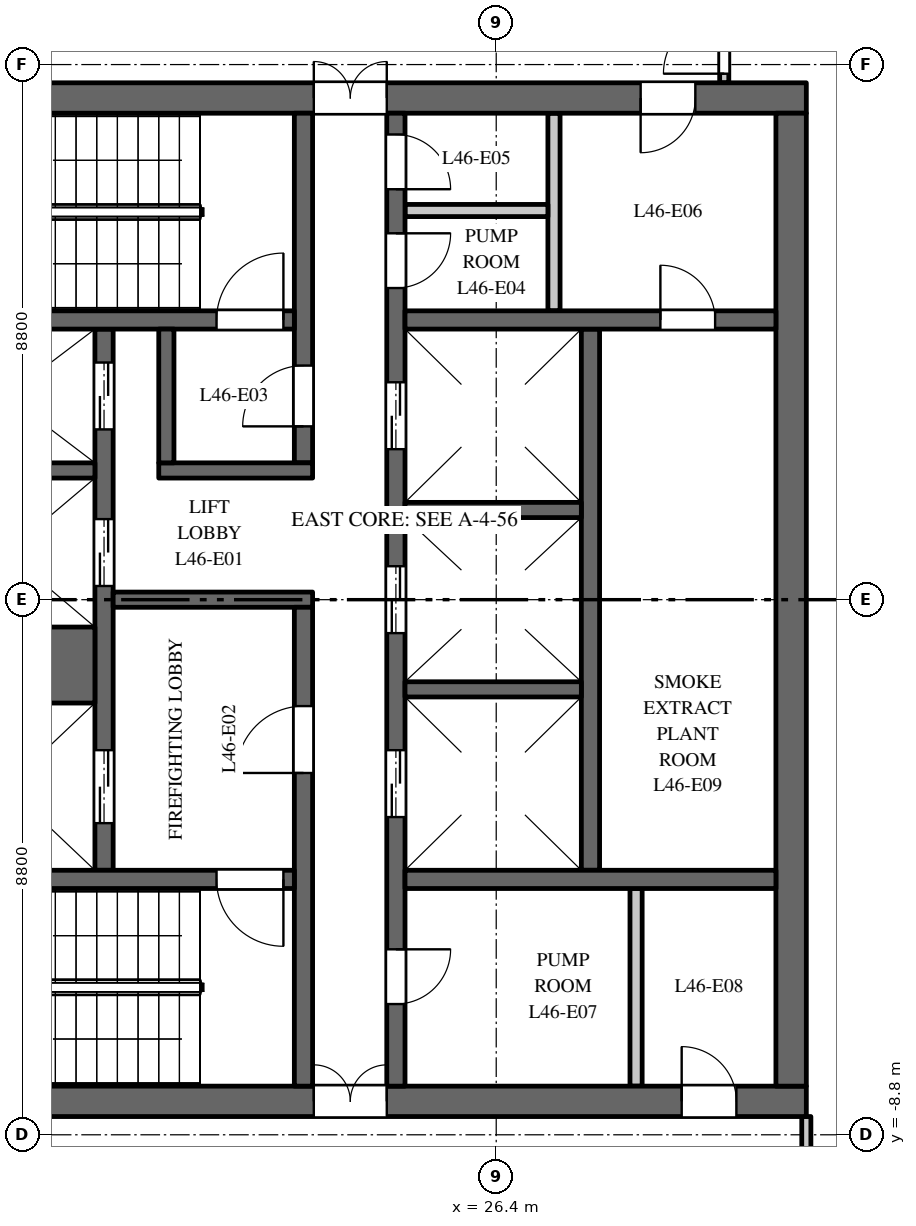
"""IFC4 building model, lengths in metres.
Left out: names, types, materials, properties, quantities, classifications, styles, units other than length and angle.
Written with IfcOpenShell. Run it as: python <this file> out.ifc"""

import sys

from ifc_helpers import new_model, si_unit, direction, frame, frame_2d, origin, place, context, subcontext, project, spatial, rectangle, extrude, element, fill, save


model = new_model("IFC4")
c1 = context("Model", 3, precision=1e-05, world=origin(), true_north=direction((0.0, 1.0)))
c2 = subcontext(c1, "Body", "Model", "MODEL_VIEW")
j1 = project(units=[si_unit("LENGTHUNIT", "METRE"), si_unit("PLANEANGLEUNIT", "RADIAN")], contexts=[c1])
p1 = place(None, origin())
s1 = spatial("IfcSite", under=j1, at=p1, CompositionType="ELEMENT")
p2 = place(p1, origin())
s2 = spatial("IfcBuilding", under=s1, at=p2, CompositionType="ELEMENT")
p3 = place(p2, frame((0.0, 0.0, 198.0)))
s3 = spatial("IfcBuildingStorey", under=s2, at=p3, CompositionType="ELEMENT", Elevation=198.0)
p4 = place(p3, frame((16.5, 8.25, 0.0), z_axis=(0.0, 0.0, 1.0), x_axis=(1.0, 0.0, 0.0)))
e1 = element("IfcWall", 1, at=p4, inside=s3, PredefinedType="SHEAR", context=c2, shape_type="SweptSolid", body=[
    extrude(rectangle(XDim=15.0, YDim=0.5, at=frame_2d((7.5, 0.0))), origin(), (0.0, 0.0, 1.0), 5.15),
])
p5 = place(p4, frame((6.9, 0.0, 0.0)))
e2 = element("IfcOpeningElement", 2, at=p5, cuts=e1, PredefinedType="OPENING", context=c2, shape_type="SweptSolid", body=[
    extrude(rectangle(XDim=1.2, YDim=2.1, at=frame_2d((0.6, 1.05))), frame((0.0, 0.26, 0.0), z_axis=(0.0, -1.0, 0.0), x_axis=(1.0, 0.0, 0.0)), (0.0, 0.0, 1.0), 0.52),
])
p6 = place(p4, frame((12.275, 0.0, 0.0)))
e3 = element("IfcOpeningElement", 3, at=p6, cuts=e1, PredefinedType="OPENING", context=c2, shape_type="SweptSolid", body=[
    extrude(rectangle(XDim=0.9, YDim=2.1, at=frame_2d((0.45, 1.05))), frame((0.0, 0.26, 0.0), z_axis=(0.0, -1.0, 0.0), x_axis=(1.0, 0.0, 0.0)), (0.0, 0.0, 1.0), 0.52),
])
p7 = place(p3, frame((16.5, -8.25, 0.0), z_axis=(0.0, 0.0, 1.0), x_axis=(1.0, 0.0, 0.0)))
e4 = element("IfcWall", 4, at=p7, inside=s3, PredefinedType="SHEAR", context=c2, shape_type="SweptSolid", body=[
    extrude(rectangle(XDim=15.0, YDim=0.5, at=frame_2d((7.5, 0.0))), origin(), (0.0, 0.0, 1.0), 5.15),
])
p8 = place(p7, frame((6.9, 0.0, 0.0)))
e5 = element("IfcOpeningElement", 5, at=p8, cuts=e4, PredefinedType="OPENING", context=c2, shape_type="SweptSolid", body=[
    extrude(rectangle(XDim=1.2, YDim=2.1, at=frame_2d((0.6, 1.05))), frame((0.0, 0.26, 0.0), z_axis=(0.0, -1.0, 0.0), x_axis=(1.0, 0.0, 0.0)), (0.0, 0.0, 1.0), 0.52),
])
p9 = place(p7, frame((12.95, 0.0, 0.0)))
e6 = element("IfcOpeningElement", 6, at=p9, cuts=e4, PredefinedType="OPENING", context=c2, shape_type="SweptSolid", body=[
    extrude(rectangle(XDim=0.9, YDim=2.1, at=frame_2d((0.45, 1.05))), frame((0.0, 0.26, 0.0), z_axis=(0.0, -1.0, 0.0), x_axis=(1.0, 0.0, 0.0)), (0.0, 0.0, 1.0), 0.52),
])
p10 = place(p3, frame((27.95, -4.45, 0.0), z_axis=(0.0, 0.0, 1.0), x_axis=(0.0, 1.0, 0.0)))
e7 = element("IfcWall", 7, at=p10, inside=s3, PredefinedType="SHEAR", context=c2, shape_type="SweptSolid", body=[
    extrude(rectangle(XDim=8.9, YDim=0.3, at=frame_2d((4.45, 0.0))), origin(), (0.0, 0.0, 1.0), 5.15),
])
p11 = place(p3, frame((19.95, -4.45, 0.0), z_axis=(0.0, 0.0, 1.0), x_axis=(0.0, 1.0, 0.0)))
e8 = element("IfcWall", 8, at=p11, inside=s3, PredefinedType="SHEAR", context=c2, shape_type="SweptSolid", body=[
    extrude(rectangle(XDim=8.9, YDim=0.3, at=frame_2d((4.45, 0.0))), origin(), (0.0, 0.0, 1.0), 5.15),
])
p12 = place(p11, frame((0.775, 0.0, 0.0)))
e9 = element("IfcOpeningElement", 9, at=p12, cuts=e8, PredefinedType="OPENING", context=c2, shape_type="SweptSolid", body=[
    extrude(rectangle(XDim=1.2, YDim=2.1, at=frame_2d((0.6, 1.05))), frame((0.0, 0.16, 0.0), z_axis=(0.0, -1.0, 0.0), x_axis=(1.0, 0.0, 0.0)), (0.0, 0.0, 1.0), 0.32),
])
p13 = place(p11, frame((4.675, 0.0, 0.0)))
e10 = element("IfcOpeningElement", 10, at=p13, cuts=e8, PredefinedType="OPENING", context=c2, shape_type="SweptSolid", body=[
    extrude(rectangle(XDim=1.1, YDim=2.1, at=frame_2d((0.55, 1.05))), frame((0.0, 0.16, 0.0), z_axis=(0.0, -1.0, 0.0), x_axis=(1.0, 0.0, 0.0)), (0.0, 0.0, 1.0), 0.32),
])
p14 = place(p11, frame((7.25, 0.0, 0.0)))
e11 = element("IfcOpeningElement", 11, at=p14, cuts=e8, PredefinedType="OPENING", context=c2, shape_type="SweptSolid", body=[
    extrude(rectangle(XDim=1.1, YDim=2.1, at=frame_2d((0.55, 1.05))), frame((0.0, 0.16, 0.0), z_axis=(0.0, -1.0, 0.0), x_axis=(1.0, 0.0, 0.0)), (0.0, 0.0, 1.0), 0.32),
])
p15 = place(p3, frame((24.75, -8.0, 0.0), z_axis=(0.0, 0.0, 1.0), x_axis=(0.0, 1.0, 0.0)))
e12 = element("IfcWall", 12, at=p15, inside=s3, PredefinedType="SHEAR", context=c2, shape_type="SweptSolid", body=[
    extrude(rectangle(XDim=16.0, YDim=0.3, at=frame_2d((8.0, 0.0))), origin(), (0.0, 0.0, 1.0), 5.15),
])
p16 = place(p15, frame((4.425, 0.0, 0.0)))
e13 = element("IfcOpeningElement", 13, at=p16, cuts=e12, PredefinedType="OPENING", context=c2, shape_type="SweptSolid", body=[
    extrude(rectangle(XDim=1.1, YDim=2.1, at=frame_2d((0.55, 1.05))), frame((0.0, 0.16, 0.0), z_axis=(0.0, -1.0, 0.0), x_axis=(1.0, 0.0, 0.0)), (0.0, 0.0, 1.0), 0.32),
])
p17 = place(p15, frame((7.45, 0.0, 0.0)))
e14 = element("IfcOpeningElement", 14, at=p17, cuts=e12, PredefinedType="OPENING", context=c2, shape_type="SweptSolid", body=[
    extrude(rectangle(XDim=1.1, YDim=2.1, at=frame_2d((0.55, 1.05))), frame((0.0, 0.16, 0.0), z_axis=(0.0, -1.0, 0.0), x_axis=(1.0, 0.0, 0.0)), (0.0, 0.0, 1.0), 0.32),
])
p18 = place(p15, frame((10.475, 0.0, 0.0)))
e15 = element("IfcOpeningElement", 15, at=p18, cuts=e12, PredefinedType="OPENING", context=c2, shape_type="SweptSolid", body=[
    extrude(rectangle(XDim=1.1, YDim=2.1, at=frame_2d((0.55, 1.05))), frame((0.0, 0.16, 0.0), z_axis=(0.0, -1.0, 0.0), x_axis=(1.0, 0.0, 0.0)), (0.0, 0.0, 1.0), 0.32),
])
p19 = place(p15, frame((13.125, 0.0, 0.0)))
e16 = element("IfcOpeningElement", 16, at=p19, cuts=e12, PredefinedType="OPENING", context=c2, shape_type="SweptSolid", body=[
    extrude(rectangle(XDim=0.9, YDim=2.1, at=frame_2d((0.45, 1.05))), frame((0.0, 0.16, 0.0), z_axis=(0.0, -1.0, 0.0), x_axis=(1.0, 0.0, 0.0)), (0.0, 0.0, 1.0), 0.32),
])
p20 = place(p15, frame((14.75, 0.0, 0.0)))
e17 = element("IfcOpeningElement", 17, at=p20, cuts=e12, PredefinedType="OPENING", context=c2, shape_type="SweptSolid", body=[
    extrude(rectangle(XDim=0.9, YDim=2.1, at=frame_2d((0.45, 1.05))), frame((0.0, 0.16, 0.0), z_axis=(0.0, -1.0, 0.0), x_axis=(1.0, 0.0, 0.0)), (0.0, 0.0, 1.0), 0.32),
])
p21 = place(p15, frame((1.35, 0.0, 0.0)))
e18 = element("IfcOpeningElement", 18, at=p21, cuts=e12, PredefinedType="OPENING", context=c2, shape_type="SweptSolid", body=[
    extrude(rectangle(XDim=0.9, YDim=2.1, at=frame_2d((0.45, 1.05))), frame((0.0, 0.16, 0.0), z_axis=(0.0, -1.0, 0.0), x_axis=(1.0, 0.0, 0.0)), (0.0, 0.0, 1.0), 0.32),
])
p22 = place(p3, frame((20.1, 0.0, 0.0), z_axis=(0.0, 0.0, 1.0), x_axis=(1.0, 0.0, 0.0)))
e19 = element("IfcWall", 19, at=p22, inside=s3, PredefinedType="SHEAR", context=c2, shape_type="SweptSolid", body=[
    extrude(rectangle(XDim=3.28, YDim=0.25, at=frame_2d((1.64, 0.0))), origin(), (0.0, 0.0, 1.0), 5.15),
])
p23 = place(p3, frame((31.25, -8.0, 0.0), z_axis=(0.0, 0.0, 1.0), x_axis=(0.0, 1.0, 0.0)))
e20 = element("IfcWall", 20, at=p23, inside=s3, PredefinedType="SHEAR", context=c2, shape_type="SweptSolid", body=[
    extrude(rectangle(XDim=16.0, YDim=0.5, at=frame_2d((8.0, 0.0))), origin(), (0.0, 0.0, 1.0), 5.15),
])
p24 = place(p3, frame((24.9, 4.6, 0.0), z_axis=(0.0, 0.0, 1.0), x_axis=(1.0, 0.0, 0.0)))
e21 = element("IfcWall", 21, at=p24, inside=s3, PredefinedType="SHEAR", context=c2, shape_type="SweptSolid", body=[
    extrude(rectangle(XDim=6.1, YDim=0.3, at=frame_2d((3.05, 0.0))), origin(), (0.0, 0.0, 1.0), 5.15),
])
p25 = place(p24, frame((4.2, 0.0, 0.0)))
e22 = element("IfcOpeningElement", 22, at=p25, cuts=e21, PredefinedType="OPENING", context=c2, shape_type="SweptSolid", body=[
    extrude(rectangle(XDim=0.9, YDim=2.1, at=frame_2d((0.45, 1.05))), frame((0.0, 0.16, 0.0), z_axis=(0.0, -1.0, 0.0), x_axis=(1.0, 0.0, 0.0)), (0.0, 0.0, 1.0), 0.32),
])
for number, where, z_axis, x_axis in (
    (23, (27.35, 4.75, 0.0), (0.0, 0.0, 1.0), (0.0, 1.0, 0.0)),
    (24, (28.7, -8.0, 0.0), (0.0, 0.0, 1.0), (0.0, 1.0, 0.0)),
):
    element("IfcWall", number, at=place(p3, frame(where, z_axis=z_axis, x_axis=x_axis)), inside=s3, PredefinedType="PARTITIONING", context=c2, shape_type="SweptSolid", body=[
        extrude(rectangle(XDim=3.25, YDim=0.2, at=frame_2d((1.625, 0.0))), origin(), (0.0, 0.0, 1.0), 5.15),
    ])
p26 = place(p3, frame((24.9, 6.4, 0.0), z_axis=(0.0, 0.0, 1.0), x_axis=(1.0, 0.0, 0.0)))
e25 = element("IfcWall", 25, at=p26, inside=s3, PredefinedType="PARTITIONING", context=c2, shape_type="SweptSolid", body=[
    extrude(rectangle(XDim=2.35, YDim=0.2, at=frame_2d((1.175, 0.0))), origin(), (0.0, 0.0, 1.0), 5.15),
])
p27 = place(p3, frame((24.9, -4.6, 0.0), z_axis=(0.0, 0.0, 1.0), x_axis=(1.0, 0.0, 0.0)))
e26 = element("IfcWall", 26, at=p27, inside=s3, PredefinedType="SHEAR", context=c2, shape_type="SweptSolid", body=[
    extrude(rectangle(XDim=6.1, YDim=0.3, at=frame_2d((3.05, 0.0))), origin(), (0.0, 0.0, 1.0), 5.15),
])
p28 = place(p3, frame((16.9, -1.075, 0.0), z_axis=(0.0, 0.0, 1.0), x_axis=(1.0, 0.0, 0.0)))
e27 = element("IfcWall", 27, at=p28, inside=s3, PredefinedType="SHEAR", context=c2, shape_type="SweptSolid", body=[
    extrude(rectangle(XDim=2.9, YDim=1.25, at=frame_2d((1.45, 0.0))), origin(), (0.0, 0.0, 1.0), 5.15),
])
for number, where, z_axis, x_axis in (
    (28, (16.9, 2.125, 0.0), (0.0, 0.0, 1.0), (1.0, 0.0, 0.0)),
    (29, (24.9, -1.475, 0.0), (0.0, 0.0, 1.0), (1.0, 0.0, 0.0)),
    (30, (24.9, 1.475, 0.0), (0.0, 0.0, 1.0), (1.0, 0.0, 0.0)),
):
    element("IfcWall", number, at=place(p3, frame(where, z_axis=z_axis, x_axis=x_axis)), inside=s3, PredefinedType="SHEAR", context=c2, shape_type="SweptSolid", body=[
        extrude(rectangle(XDim=2.9, YDim=0.25, at=frame_2d((1.45, 0.0))), origin(), (0.0, 0.0, 1.0), 5.15),
    ])
p29 = place(p3, frame((23.23, 2.25, 0.0), z_axis=(0.0, 0.0, 1.0), x_axis=(0.0, 1.0, 0.0)))
e31 = element("IfcWall", 31, at=p29, inside=s3, PredefinedType="SHEAR", context=c2, shape_type="SweptSolid", body=[
    extrude(rectangle(XDim=5.75, YDim=0.3, at=frame_2d((2.875, 0.0))), origin(), (0.0, 0.0, 1.0), 5.15),
])
p30 = place(p29, frame((0.6, 0.0, 0.0)))
e32 = element("IfcOpeningElement", 32, at=p30, cuts=e31, PredefinedType="OPENING", context=c2, shape_type="SweptSolid", body=[
    extrude(rectangle(XDim=1.0, YDim=2.1, at=frame_2d((0.5, 1.05))), frame((0.0, 0.16, 0.0), z_axis=(0.0, -1.0, 0.0), x_axis=(1.0, 0.0, 0.0)), (0.0, 0.0, 1.0), 0.32),
])
p31 = place(p3, frame((23.23, -8.0, 0.0), z_axis=(0.0, 0.0, 1.0), x_axis=(0.0, 1.0, 0.0)))
e33 = element("IfcWall", 33, at=p31, inside=s3, PredefinedType="SHEAR", context=c2, shape_type="SweptSolid", body=[
    extrude(rectangle(XDim=7.875, YDim=0.3, at=frame_2d((3.938, 0.0))), origin(), (0.0, 0.0, 1.0), 5.15),
])
p32 = place(p31, frame((5.15, 0.0, 0.0)))
e34 = element("IfcOpeningElement", 34, at=p32, cuts=e33, PredefinedType="OPENING", context=c2, shape_type="SweptSolid", body=[
    extrude(rectangle(XDim=1.1, YDim=2.1, at=frame_2d((0.55, 1.05))), frame((0.0, 0.16, 0.0), z_axis=(0.0, -1.0, 0.0), x_axis=(1.0, 0.0, 0.0)), (0.0, 0.0, 1.0), 0.32),
])
p33 = place(p3, frame((16.9, 4.6, 0.0), z_axis=(0.0, 0.0, 1.0), x_axis=(1.0, 0.0, 0.0)))
e35 = element("IfcWall", 35, at=p33, inside=s3, PredefinedType="SHEAR", context=c2, shape_type="SweptSolid", body=[
    extrude(rectangle(XDim=6.18, YDim=0.3, at=frame_2d((3.09, 0.0))), origin(), (0.0, 0.0, 1.0), 5.15),
])
p34 = place(p33, frame((4.9, 0.0, 0.0)))
e36 = element("IfcOpeningElement", 36, at=p34, cuts=e35, PredefinedType="OPENING", context=c2, shape_type="SweptSolid", body=[
    extrude(rectangle(XDim=1.1, YDim=2.1, at=frame_2d((0.55, 1.05))), frame((0.0, 0.16, 0.0), z_axis=(0.0, -1.0, 0.0), x_axis=(1.0, 0.0, 0.0)), (0.0, 0.0, 1.0), 0.32),
])
p35 = place(p3, frame((16.9, -4.6, 0.0), z_axis=(0.0, 0.0, 1.0), x_axis=(1.0, 0.0, 0.0)))
e37 = element("IfcWall", 37, at=p35, inside=s3, PredefinedType="SHEAR", context=c2, shape_type="SweptSolid", body=[
    extrude(rectangle(XDim=6.18, YDim=0.3, at=frame_2d((3.09, 0.0))), origin(), (0.0, 0.0, 1.0), 5.15),
])
p36 = place(p35, frame((4.9, 0.0, 0.0)))
e38 = element("IfcOpeningElement", 38, at=p36, cuts=e37, PredefinedType="OPENING", context=c2, shape_type="SweptSolid", body=[
    extrude(rectangle(XDim=1.1, YDim=2.1, at=frame_2d((0.55, 1.05))), frame((0.0, 0.16, 0.0), z_axis=(0.0, -1.0, 0.0), x_axis=(1.0, 0.0, 0.0)), (0.0, 0.0, 1.0), 0.32),
])
p37 = place(p3, frame((20.85, 2.125, 0.0), z_axis=(0.0, 0.0, 1.0), x_axis=(1.0, 0.0, 0.0)))
e39 = element("IfcWall", 39, at=p37, inside=s3, PredefinedType="SHEAR", context=c2, shape_type="SweptSolid", body=[
    extrude(rectangle(XDim=2.53, YDim=0.25, at=frame_2d((1.265, 0.0))), origin(), (0.0, 0.0, 1.0), 5.15),
])
p38 = place(p3, frame((20.975, 2.25, 0.0), z_axis=(0.0, 0.0, 1.0), x_axis=(0.0, 1.0, 0.0)))
e40 = element("IfcWall", 40, at=p38, inside=s3, PredefinedType="SHEAR", context=c2, shape_type="SweptSolid", body=[
    extrude(rectangle(XDim=2.2, YDim=0.25, at=frame_2d((1.1, 0.0))), origin(), (0.0, 0.0, 1.0), 5.15),
])
p39 = place(p3, frame((31.5, -10.7, 0.0), z_axis=(0.0, 0.0, 1.0), x_axis=(0.0, 1.0, 0.0)))
e41 = element("IfcWall", 41, at=p39, inside=s3, PredefinedType="PARTITIONING", context=c2, shape_type="SweptSolid", body=[
    extrude(rectangle(XDim=2.2, YDim=0.15, at=frame_2d((1.1, 0.0))), origin(), (0.0, 0.0, 1.0), 5.15),
])
p40 = place(p3, frame((30.15, 8.5, 0.0), z_axis=(0.0, 0.0, 1.0), x_axis=(0.0, 1.0, 0.0)))
e42 = element("IfcWall", 42, at=p40, inside=s3, PredefinedType="PARTITIONING", context=c2, shape_type="SweptSolid", body=[
    extrude(rectangle(XDim=2.2, YDim=0.15, at=frame_2d((1.1, 0.0))), origin(), (0.0, 0.0, 1.0), 5.15),
])
p41 = place(p40, frame((0.15, 0.0, 0.0)))
e43 = element("IfcOpeningElement", 43, at=p41, cuts=e42, PredefinedType="OPENING", context=c2, shape_type="SweptSolid", body=[
    extrude(rectangle(XDim=1.0, YDim=2.1, at=frame_2d((0.5, 1.05))), frame((0.0, 0.085, 0.0), z_axis=(0.0, -1.0, 0.0), x_axis=(1.0, 0.0, 0.0)), (0.0, 0.0, 1.0), 0.17),
])
p42 = place(p12, origin())
e44 = element("IfcDoor", 44, at=p42, inside=s3, OperationType="DOUBLE_DOOR_SLIDING", PredefinedType="DOOR", context=c2, shape_type="SweptSolid", body=[
    extrude(rectangle(XDim=1.2, YDim=2.1, at=frame_2d((0.6, 1.05))), frame((0.0, 0.025, 0.0), z_axis=(0.0, -1.0, 0.0), x_axis=(1.0, 0.0, 0.0)), (0.0, 0.0, 1.0), 0.05),
])
fill(e9, e44)
p43 = place(p13, origin())
e45 = element("IfcDoor", 45, at=p43, inside=s3, OperationType="DOUBLE_DOOR_SLIDING", PredefinedType="DOOR", context=c2, shape_type="SweptSolid", body=[
    extrude(rectangle(XDim=1.1, YDim=2.1, at=frame_2d((0.55, 1.05))), frame((0.0, 0.025, 0.0), z_axis=(0.0, -1.0, 0.0), x_axis=(1.0, 0.0, 0.0)), (0.0, 0.0, 1.0), 0.05),
])
fill(e10, e45)
p44 = place(p14, origin())
e46 = element("IfcDoor", 46, at=p44, inside=s3, OperationType="DOUBLE_DOOR_SLIDING", PredefinedType="DOOR", context=c2, shape_type="SweptSolid", body=[
    extrude(rectangle(XDim=1.1, YDim=2.1, at=frame_2d((0.55, 1.05))), frame((0.0, 0.025, 0.0), z_axis=(0.0, -1.0, 0.0), x_axis=(1.0, 0.0, 0.0)), (0.0, 0.0, 1.0), 0.05),
])
fill(e11, e46)
p45 = place(p16, origin())
e47 = element("IfcDoor", 47, at=p45, inside=s3, OperationType="DOUBLE_DOOR_SLIDING", PredefinedType="DOOR", context=c2, shape_type="SweptSolid", body=[
    extrude(rectangle(XDim=1.1, YDim=2.1, at=frame_2d((0.55, 1.05))), frame((0.0, 0.025, 0.0), z_axis=(0.0, -1.0, 0.0), x_axis=(1.0, 0.0, 0.0)), (0.0, 0.0, 1.0), 0.05),
])
fill(e13, e47)
p46 = place(p17, origin())
e48 = element("IfcDoor", 48, at=p46, inside=s3, OperationType="DOUBLE_DOOR_SLIDING", PredefinedType="DOOR", context=c2, shape_type="SweptSolid", body=[
    extrude(rectangle(XDim=1.1, YDim=2.1, at=frame_2d((0.55, 1.05))), frame((0.0, 0.025, 0.0), z_axis=(0.0, -1.0, 0.0), x_axis=(1.0, 0.0, 0.0)), (0.0, 0.0, 1.0), 0.05),
])
fill(e14, e48)
p47 = place(p18, origin())
e49 = element("IfcDoor", 49, at=p47, inside=s3, OperationType="DOUBLE_DOOR_SLIDING", PredefinedType="DOOR", context=c2, shape_type="SweptSolid", body=[
    extrude(rectangle(XDim=1.1, YDim=2.1, at=frame_2d((0.55, 1.05))), frame((0.0, 0.025, 0.0), z_axis=(0.0, -1.0, 0.0), x_axis=(1.0, 0.0, 0.0)), (0.0, 0.0, 1.0), 0.05),
])
fill(e15, e49)
p48 = place(p34, origin())
e50 = element("IfcDoor", 50, at=p48, inside=s3, OperationType="SINGLE_SWING_LEFT", PredefinedType="DOOR", context=c2, shape_type="SweptSolid", body=[
    extrude(rectangle(XDim=1.1, YDim=2.1, at=frame_2d((0.55, 1.05))), frame((0.0, 0.025, 0.0), z_axis=(0.0, -1.0, 0.0), x_axis=(1.0, 0.0, 0.0)), (0.0, 0.0, 1.0), 0.05),
])
fill(e36, e50)
p49 = place(p36, origin())
e51 = element("IfcDoor", 51, at=p49, inside=s3, OperationType="SINGLE_SWING_RIGHT", PredefinedType="DOOR", context=c2, shape_type="SweptSolid", body=[
    extrude(rectangle(XDim=1.1, YDim=2.1, at=frame_2d((0.55, 1.05))), frame((0.0, 0.025, 0.0), z_axis=(0.0, -1.0, 0.0), x_axis=(1.0, 0.0, 0.0)), (0.0, 0.0, 1.0), 0.05),
])
fill(e38, e51)
p50 = place(p32, origin())
e52 = element("IfcDoor", 52, at=p50, inside=s3, OperationType="SINGLE_SWING_RIGHT", PredefinedType="DOOR", context=c2, shape_type="SweptSolid", body=[
    extrude(rectangle(XDim=1.1, YDim=2.1, at=frame_2d((0.55, 1.05))), frame((0.0, 0.025, 0.0), z_axis=(0.0, -1.0, 0.0), x_axis=(1.0, 0.0, 0.0)), (0.0, 0.0, 1.0), 0.05),
])
fill(e34, e52)
p51 = place(p30, origin())
e53 = element("IfcDoor", 53, at=p51, inside=s3, OperationType="SINGLE_SWING_RIGHT", PredefinedType="DOOR", context=c2, shape_type="SweptSolid", body=[
    extrude(rectangle(XDim=1.0, YDim=2.1, at=frame_2d((0.5, 1.05))), frame((0.0, 0.025, 0.0), z_axis=(0.0, -1.0, 0.0), x_axis=(1.0, 0.0, 0.0)), (0.0, 0.0, 1.0), 0.05),
])
fill(e32, e53)
p52 = place(p5, origin())
e54 = element("IfcDoor", 54, at=p52, inside=s3, OperationType="DOUBLE_DOOR_DOUBLE_SWING", PredefinedType="DOOR", context=c2, shape_type="SweptSolid", body=[
    extrude(rectangle(XDim=1.2, YDim=2.1, at=frame_2d((0.6, 1.05))), frame((0.0, 0.025, 0.0), z_axis=(0.0, -1.0, 0.0), x_axis=(1.0, 0.0, 0.0)), (0.0, 0.0, 1.0), 0.05),
])
fill(e2, e54)
p53 = place(p8, origin())
e55 = element("IfcDoor", 55, at=p53, inside=s3, OperationType="DOUBLE_DOOR_DOUBLE_SWING", PredefinedType="DOOR", context=c2, shape_type="SweptSolid", body=[
    extrude(rectangle(XDim=1.2, YDim=2.1, at=frame_2d((0.6, 1.05))), frame((0.0, 0.025, 0.0), z_axis=(0.0, -1.0, 0.0), x_axis=(1.0, 0.0, 0.0)), (0.0, 0.0, 1.0), 0.05),
])
fill(e5, e55)
p54 = place(p19, origin())
e56 = element("IfcDoor", 56, at=p54, inside=s3, OperationType="SINGLE_SWING_RIGHT", PredefinedType="DOOR", context=c2, shape_type="SweptSolid", body=[
    extrude(rectangle(XDim=0.9, YDim=2.1, at=frame_2d((0.45, 1.05))), frame((0.0, 0.025, 0.0), z_axis=(0.0, -1.0, 0.0), x_axis=(1.0, 0.0, 0.0)), (0.0, 0.0, 1.0), 0.05),
])
fill(e16, e56)
p55 = place(p20, origin())
e57 = element("IfcDoor", 57, at=p55, inside=s3, OperationType="SINGLE_SWING_LEFT", PredefinedType="DOOR", context=c2, shape_type="SweptSolid", body=[
    extrude(rectangle(XDim=0.9, YDim=2.1, at=frame_2d((0.45, 1.05))), frame((0.0, 0.025, 0.0), z_axis=(0.0, -1.0, 0.0), x_axis=(1.0, 0.0, 0.0)), (0.0, 0.0, 1.0), 0.05),
])
fill(e17, e57)
p56 = place(p6, origin())
e58 = element("IfcDoor", 58, at=p56, inside=s3, OperationType="SINGLE_SWING_LEFT", PredefinedType="DOOR", context=c2, shape_type="SweptSolid", body=[
    extrude(rectangle(XDim=0.9, YDim=2.1, at=frame_2d((0.45, 1.05))), frame((0.0, 0.025, 0.0), z_axis=(0.0, -1.0, 0.0), x_axis=(1.0, 0.0, 0.0)), (0.0, 0.0, 1.0), 0.05),
])
fill(e3, e58)
p57 = place(p21, origin())
e59 = element("IfcDoor", 59, at=p57, inside=s3, OperationType="SINGLE_SWING_RIGHT", PredefinedType="DOOR", context=c2, shape_type="SweptSolid", body=[
    extrude(rectangle(XDim=0.9, YDim=2.1, at=frame_2d((0.45, 1.05))), frame((0.0, 0.025, 0.0), z_axis=(0.0, -1.0, 0.0), x_axis=(1.0, 0.0, 0.0)), (0.0, 0.0, 1.0), 0.05),
])
fill(e18, e59)
p58 = place(p9, origin())
e60 = element("IfcDoor", 60, at=p58, inside=s3, OperationType="SINGLE_SWING_RIGHT", PredefinedType="DOOR", context=c2, shape_type="SweptSolid", body=[
    extrude(rectangle(XDim=0.9, YDim=2.1, at=frame_2d((0.45, 1.05))), frame((0.0, 0.025, 0.0), z_axis=(0.0, -1.0, 0.0), x_axis=(1.0, 0.0, 0.0)), (0.0, 0.0, 1.0), 0.05),
])
fill(e6, e60)
p59 = place(p25, origin())
e61 = element("IfcDoor", 61, at=p59, inside=s3, OperationType="SINGLE_SWING_RIGHT", PredefinedType="DOOR", context=c2, shape_type="SweptSolid", body=[
    extrude(rectangle(XDim=0.9, YDim=2.1, at=frame_2d((0.45, 1.05))), frame((0.0, 0.025, 0.0), z_axis=(0.0, -1.0, 0.0), x_axis=(1.0, 0.0, 0.0)), (0.0, 0.0, 1.0), 0.05),
])
fill(e22, e61)
p60 = place(p41, origin())
e62 = element("IfcDoor", 62, at=p60, inside=s3, OperationType="SINGLE_SWING_LEFT", PredefinedType="DOOR", context=c2, shape_type="SweptSolid", body=[
    extrude(rectangle(XDim=1.0, YDim=2.1, at=frame_2d((0.5, 1.05))), frame((0.0, 0.025, 0.0), z_axis=(0.0, -1.0, 0.0), x_axis=(1.0, 0.0, 0.0)), (0.0, 0.0, 1.0), 0.05),
])
fill(e43, e62)
save(model, sys.argv[1])
